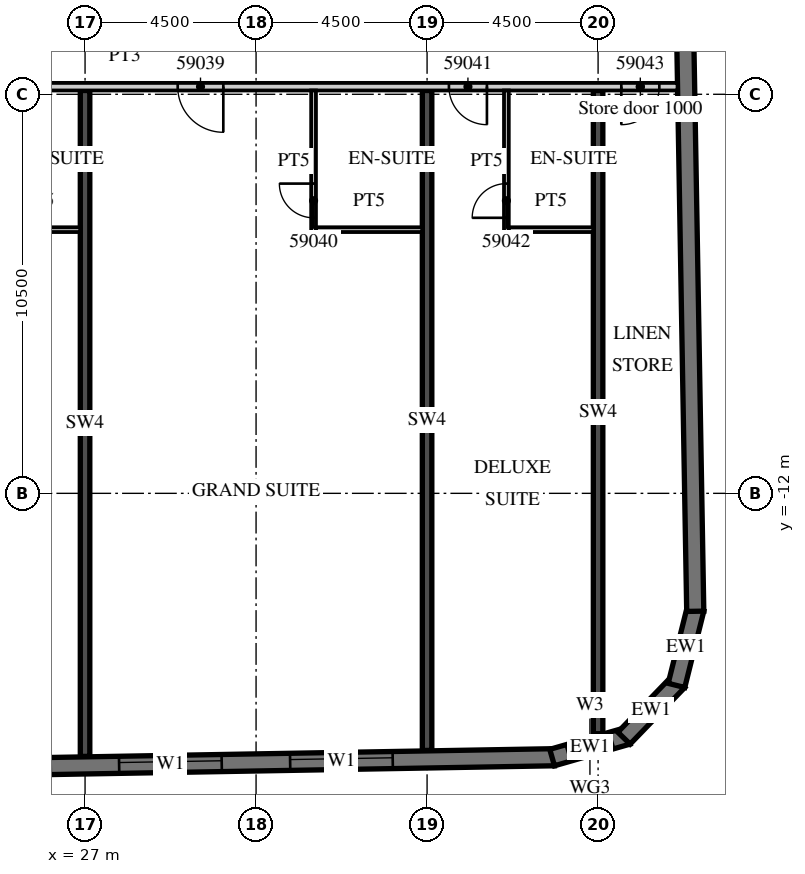
"""IFC4 building model, lengths in metres.
Left out: names, types, materials, properties, quantities, classifications, styles, units other than length and angle.
Written with IfcOpenShell. Run it as: python <this file> out.ifc"""

import sys

from ifc_helpers import new_model, si_unit, direction, frame, frame_2d, origin, place, context, subcontext, project, spatial, polyline, rectangle, outline, extrude, element, fill, save


model = new_model("IFC4")
c1 = context("Model", 3, precision=1e-05, world=origin(), true_north=direction((0.0, 1.0)))
c2 = subcontext(c1, "Body", "Model", "MODEL_VIEW")
j1 = project(units=[si_unit("LENGTHUNIT", "METRE"), si_unit("PLANEANGLEUNIT", "RADIAN")], contexts=[c1])
p1 = place(None, origin())
s1 = spatial("IfcSite", under=j1, at=p1, CompositionType="ELEMENT")
p2 = place(p1, origin())
s2 = spatial("IfcBuilding", under=s1, at=p2, CompositionType="ELEMENT")
p3 = place(p2, frame((0.0, 0.0, 240.8)))
s3 = spatial("IfcBuildingStorey", under=s2, at=p3, CompositionType="ELEMENT", Elevation=240.8)
p4 = place(p3, frame((27.0, -18.922, 0.0), z_axis=(0.0, 0.0, 1.0), x_axis=(0.0, 1.0, 0.0)))
e1 = element("IfcWall", 1, at=p4, inside=s3, PredefinedType="SHEAR", context=c2, shape_type="SweptSolid", body=[
    extrude(rectangle(XDim=17.522, YDim=0.25, at=frame_2d((8.761, 0.0))), origin(), (0.0, 0.0, 1.0), 3.3),
])
p5 = place(p3, frame((36.0, -18.765, 0.0), z_axis=(0.0, 0.0, 1.0), x_axis=(0.0, 1.0, 0.0)))
e2 = element("IfcWall", 2, at=p5, inside=s3, PredefinedType="SHEAR", context=c2, shape_type="SweptSolid", body=[
    extrude(rectangle(XDim=17.365, YDim=0.25, at=frame_2d((8.683, 0.0))), origin(), (0.0, 0.0, 1.0), 3.3),
])
p6 = place(p3, frame((40.5, -18.325, 0.0), z_axis=(0.0, 0.0, 1.0), x_axis=(0.0, 1.0, 0.0)))
e3 = element("IfcWall", 3, at=p6, inside=s3, PredefinedType="SHEAR", context=c2, shape_type="SweptSolid", body=[
    extrude(rectangle(XDim=16.925, YDim=0.25, at=frame_2d((8.463, 0.0))), origin(), (0.0, 0.0, 1.0), 3.3),
])
p7 = place(p3, frame((-13.504, -19.866, 0.0), z_axis=(0.0, 0.0, 1.0), x_axis=(0.999847672978, 0.017453676992, 0.0)))
e4 = element("IfcWall", 4, at=p7, inside=s3, PredefinedType="SOLIDWALL", context=c2, shape_type="SweptSolid", body=[
    extrude(rectangle(XDim=52.86, YDim=0.45, at=frame_2d((26.43, 0.0))), origin(), (0.0, 0.0, 1.0), 3.02),
])
p8 = place(p7, frame((0.9, 0.0, 0.45)))
e5 = element("IfcOpeningElement", 5, at=p8, cuts=e4, PredefinedType="OPENING", context=c2, shape_type="SweptSolid", body=[
    extrude(rectangle(XDim=2.7, YDim=2.25, at=frame_2d((1.35, 1.125))), frame((0.0, 0.235, 0.0), z_axis=(0.0, -1.0, 0.0), x_axis=(1.0, 0.0, 0.0)), (0.0, 0.0, 1.0), 0.47),
])
p9 = place(p7, frame((5.401, 0.0, 0.45)))
e6 = element("IfcOpeningElement", 6, at=p9, cuts=e4, PredefinedType="OPENING", context=c2, shape_type="SweptSolid", body=[
    extrude(rectangle(XDim=2.7, YDim=2.25, at=frame_2d((1.35, 1.125))), frame((0.0, 0.235, 0.0), z_axis=(0.0, -1.0, 0.0), x_axis=(1.0, 0.0, 0.0)), (0.0, 0.0, 1.0), 0.47),
])
p10 = place(p7, frame((9.902, 0.0, 0.45)))
e7 = element("IfcOpeningElement", 7, at=p10, cuts=e4, PredefinedType="OPENING", context=c2, shape_type="SweptSolid", body=[
    extrude(rectangle(XDim=2.7, YDim=2.25, at=frame_2d((1.35, 1.125))), frame((0.0, 0.235, 0.0), z_axis=(0.0, -1.0, 0.0), x_axis=(1.0, 0.0, 0.0)), (0.0, 0.0, 1.0), 0.47),
])
p11 = place(p7, frame((14.402, 0.0, 0.45)))
e8 = element("IfcOpeningElement", 8, at=p11, cuts=e4, PredefinedType="OPENING", context=c2, shape_type="SweptSolid", body=[
    extrude(rectangle(XDim=2.7, YDim=2.25, at=frame_2d((1.35, 1.125))), frame((0.0, 0.235, 0.0), z_axis=(0.0, -1.0, 0.0), x_axis=(1.0, 0.0, 0.0)), (0.0, 0.0, 1.0), 0.47),
])
p12 = place(p7, frame((18.903, 0.0, 0.45)))
e9 = element("IfcOpeningElement", 9, at=p12, cuts=e4, PredefinedType="OPENING", context=c2, shape_type="SweptSolid", body=[
    extrude(rectangle(XDim=2.7, YDim=2.25, at=frame_2d((1.35, 1.125))), frame((0.0, 0.235, 0.0), z_axis=(0.0, -1.0, 0.0), x_axis=(1.0, 0.0, 0.0)), (0.0, 0.0, 1.0), 0.47),
])
p13 = place(p7, frame((23.404, 0.0, 0.45)))
e10 = element("IfcOpeningElement", 10, at=p13, cuts=e4, PredefinedType="OPENING", context=c2, shape_type="SweptSolid", body=[
    extrude(rectangle(XDim=2.7, YDim=2.25, at=frame_2d((1.35, 1.125))), frame((0.0, 0.235, 0.0), z_axis=(0.0, -1.0, 0.0), x_axis=(1.0, 0.0, 0.0)), (0.0, 0.0, 1.0), 0.47),
])
p14 = place(p7, frame((27.904, 0.0, 0.45)))
e11 = element("IfcOpeningElement", 11, at=p14, cuts=e4, PredefinedType="OPENING", context=c2, shape_type="SweptSolid", body=[
    extrude(rectangle(XDim=2.7, YDim=2.25, at=frame_2d((1.35, 1.125))), frame((0.0, 0.235, 0.0), z_axis=(0.0, -1.0, 0.0), x_axis=(1.0, 0.0, 0.0)), (0.0, 0.0, 1.0), 0.47),
])
p15 = place(p7, frame((32.405, 0.0, 0.45)))
e12 = element("IfcOpeningElement", 12, at=p15, cuts=e4, PredefinedType="OPENING", context=c2, shape_type="SweptSolid", body=[
    extrude(rectangle(XDim=2.7, YDim=2.25, at=frame_2d((1.35, 1.125))), frame((0.0, 0.235, 0.0), z_axis=(0.0, -1.0, 0.0), x_axis=(1.0, 0.0, 0.0)), (0.0, 0.0, 1.0), 0.47),
])
p16 = place(p7, frame((36.906, 0.0, 0.45)))
e13 = element("IfcOpeningElement", 13, at=p16, cuts=e4, PredefinedType="OPENING", context=c2, shape_type="SweptSolid", body=[
    extrude(rectangle(XDim=2.7, YDim=2.25, at=frame_2d((1.35, 1.125))), frame((0.0, 0.235, 0.0), z_axis=(0.0, -1.0, 0.0), x_axis=(1.0, 0.0, 0.0)), (0.0, 0.0, 1.0), 0.47),
])
p17 = place(p7, frame((41.406, 0.0, 0.45)))
e14 = element("IfcOpeningElement", 14, at=p17, cuts=e4, PredefinedType="OPENING", context=c2, shape_type="SweptSolid", body=[
    extrude(rectangle(XDim=2.7, YDim=2.25, at=frame_2d((1.35, 1.125))), frame((0.0, 0.235, 0.0), z_axis=(0.0, -1.0, 0.0), x_axis=(1.0, 0.0, 0.0)), (0.0, 0.0, 1.0), 0.47),
])
p18 = place(p7, frame((45.907, 0.0, 0.45)))
e15 = element("IfcOpeningElement", 15, at=p18, cuts=e4, PredefinedType="OPENING", context=c2, shape_type="SweptSolid", body=[
    extrude(rectangle(XDim=2.7, YDim=2.25, at=frame_2d((1.35, 1.125))), frame((0.0, 0.235, 0.0), z_axis=(0.0, -1.0, 0.0), x_axis=(1.0, 0.0, 0.0)), (0.0, 0.0, 1.0), 0.47),
])
p19 = place(p3, frame((39.29, -18.952, 0.0), z_axis=(0.0, 0.0, 1.0), x_axis=(0.961247584925, 0.275686562016, 0.0)))
e16 = element("IfcWall", 16, at=p19, inside=s3, PredefinedType="SOLIDWALL", context=c2, shape_type="SweptSolid", body=[
    extrude(outline(polyline([(0.0, -0.225), (2.071, -0.225), (1.95, 0.225), (0.121, 0.225), (0.0, -0.225)])), origin(), (0.0, 0.0, 1.0), 3.02),
])
p20 = place(p19, frame((0.435, 0.0, 0.45)))
e17 = element("IfcOpeningElement", 17, at=p20, cuts=e16, PredefinedType="OPENING", context=c2, shape_type="SweptSolid", body=[
    extrude(rectangle(XDim=1.2, YDim=2.25, at=frame_2d((0.6, 1.125))), frame((0.0, 0.235, 0.0), z_axis=(0.0, -1.0, 0.0), x_axis=(1.0, 0.0, 0.0)), (0.0, 0.0, 1.0), 0.47),
])
p21 = place(p3, frame((41.181, -18.442, 0.0), z_axis=(0.0, 0.0, 1.0), x_axis=(0.694678672846, 0.719320193998, 0.0)))
e18 = element("IfcWall", 18, at=p21, inside=s3, PredefinedType="SOLIDWALL", context=c2, shape_type="SweptSolid", body=[
    extrude(outline(polyline([(0.0, -0.225), (2.071, -0.225), (1.95, 0.225), (0.121, 0.225), (0.0, -0.225)])), origin(), (0.0, 0.0, 1.0), 3.02),
])
p22 = place(p3, frame((42.563, -17.054, 0.0), z_axis=(0.0, 0.0, 1.0), x_axis=(0.241841950319, 0.970315655375, 0.0)))
e19 = element("IfcWall", 19, at=p22, inside=s3, PredefinedType="SOLIDWALL", context=c2, shape_type="SweptSolid", body=[
    extrude(outline(polyline([(0.0, -0.225), (2.071, -0.225), (1.95, 0.225), (0.121, 0.225), (0.0, -0.225)])), origin(), (0.0, 0.0, 1.0), 3.02),
])
p23 = place(p3, frame((43.057, -15.103, 0.0), z_axis=(0.0, 0.0, 1.0), x_axis=(-0.017452408953, 0.999847695112, 0.0)))
e20 = element("IfcWall", 20, at=p23, inside=s3, PredefinedType="SOLIDWALL", context=c2, shape_type="SweptSolid", body=[
    extrude(rectangle(XDim=33.0, YDim=0.45, at=frame_2d((16.5, 0.0))), origin(), (0.0, 0.0, 1.0), 3.02),
])
p24 = place(p3, frame((13.5, -1.3, 0.0), z_axis=(0.0, 0.0, 1.0), x_axis=(1.0, 0.0, 0.0)))
e21 = element("IfcWall", 21, at=p24, inside=s3, PredefinedType="PARTITIONING", context=c2, shape_type="SweptSolid", body=[
    extrude(rectangle(XDim=29.091, YDim=0.2, at=frame_2d((14.545, 0.0))), origin(), (0.0, 0.0, 1.0), 3.02),
])
p25 = place(p24, frame((0.575, 0.0, 0.0)))
e22 = element("IfcOpeningElement", 22, at=p25, cuts=e21, PredefinedType="OPENING", context=c2, shape_type="SweptSolid", body=[
    extrude(rectangle(XDim=1.0, YDim=2.1, at=frame_2d((0.5, 1.05))), frame((0.0, 0.11, 0.0), z_axis=(0.0, -1.0, 0.0), x_axis=(1.0, 0.0, 0.0)), (0.0, 0.0, 1.0), 0.22),
])
p26 = place(p24, frame((7.45, 0.0, 0.0)))
e23 = element("IfcOpeningElement", 23, at=p26, cuts=e21, PredefinedType="OPENING", context=c2, shape_type="SweptSolid", body=[
    extrude(rectangle(XDim=1.0, YDim=2.1, at=frame_2d((0.5, 1.05))), frame((0.0, 0.11, 0.0), z_axis=(0.0, -1.0, 0.0), x_axis=(1.0, 0.0, 0.0)), (0.0, 0.0, 1.0), 0.22),
])
p27 = place(p24, frame((9.55, 0.0, 0.0)))
e24 = element("IfcOpeningElement", 24, at=p27, cuts=e21, PredefinedType="OPENING", context=c2, shape_type="SweptSolid", body=[
    extrude(rectangle(XDim=1.0, YDim=2.1, at=frame_2d((0.5, 1.05))), frame((0.0, 0.11, 0.0), z_axis=(0.0, -1.0, 0.0), x_axis=(1.0, 0.0, 0.0)), (0.0, 0.0, 1.0), 0.22),
])
p28 = place(p24, frame((15.938, 0.0, 0.0)))
e25 = element("IfcOpeningElement", 25, at=p28, cuts=e21, PredefinedType="OPENING", context=c2, shape_type="SweptSolid", body=[
    extrude(rectangle(XDim=1.2, YDim=2.1, at=frame_2d((0.6, 1.05))), frame((0.0, 0.11, 0.0), z_axis=(0.0, -1.0, 0.0), x_axis=(1.0, 0.0, 0.0)), (0.0, 0.0, 1.0), 0.22),
])
p29 = place(p24, frame((23.075, 0.0, 0.0)))
e26 = element("IfcOpeningElement", 26, at=p29, cuts=e21, PredefinedType="OPENING", context=c2, shape_type="SweptSolid", body=[
    extrude(rectangle(XDim=1.0, YDim=2.1, at=frame_2d((0.5, 1.05))), frame((0.0, 0.11, 0.0), z_axis=(0.0, -1.0, 0.0), x_axis=(1.0, 0.0, 0.0)), (0.0, 0.0, 1.0), 0.22),
])
p30 = place(p24, frame((27.611, 0.0, 0.0)))
e27 = element("IfcOpeningElement", 27, at=p30, cuts=e21, PredefinedType="OPENING", context=c2, shape_type="SweptSolid", body=[
    extrude(rectangle(XDim=1.0, YDim=2.4, at=frame_2d((0.5, 1.2))), frame((0.0, 0.11, 0.0), z_axis=(0.0, -1.0, 0.0), x_axis=(1.0, 0.0, 0.0)), (0.0, 0.0, 1.0), 0.22),
])
p31 = place(p3, frame((24.625, -5.062, 0.0), z_axis=(0.0, 0.0, 1.0), x_axis=(1.0, 0.0, 0.0)))
e28 = element("IfcWall", 28, at=p31, inside=s3, PredefinedType="PARTITIONING", context=c2, shape_type="SweptSolid", body=[
    extrude(rectangle(XDim=2.25, YDim=0.125, at=frame_2d((1.125, 0.0))), origin(), (0.0, 0.0, 1.0), 3.02),
])
p32 = place(p3, frame((33.013, -5.125, 0.0), z_axis=(0.0, 0.0, 1.0), x_axis=(0.0, 1.0, 0.0)))
e29 = element("IfcWall", 29, at=p32, inside=s3, PredefinedType="PARTITIONING", context=c2, shape_type="SweptSolid", body=[
    extrude(rectangle(XDim=3.725, YDim=0.125, at=frame_2d((1.863, 0.0))), origin(), (0.0, 0.0, 1.0), 3.02),
])
p33 = place(p32, frame((0.375, 0.0, 0.0)))
e30 = element("IfcOpeningElement", 30, at=p33, cuts=e29, PredefinedType="OPENING", context=c2, shape_type="SweptSolid", body=[
    extrude(rectangle(XDim=0.9, YDim=2.1, at=frame_2d((0.45, 1.05))), frame((0.0, 0.073, 0.0), z_axis=(0.0, -1.0, 0.0), x_axis=(1.0, 0.0, 0.0)), (0.0, 0.0, 1.0), 0.145),
])
p34 = place(p3, frame((33.075, -5.062, 0.0), z_axis=(0.0, 0.0, 1.0), x_axis=(1.0, 0.0, 0.0)))
e31 = element("IfcWall", 31, at=p34, inside=s3, PredefinedType="PARTITIONING", context=c2, shape_type="SweptSolid", body=[
    extrude(rectangle(XDim=2.8, YDim=0.125, at=frame_2d((1.4, 0.0))), origin(), (0.0, 0.0, 1.0), 3.02),
])
p35 = place(p3, frame((38.087, -5.125, 0.0), z_axis=(0.0, 0.0, 1.0), x_axis=(0.0, 1.0, 0.0)))
e32 = element("IfcWall", 32, at=p35, inside=s3, PredefinedType="PARTITIONING", context=c2, shape_type="SweptSolid", body=[
    extrude(rectangle(XDim=3.725, YDim=0.125, at=frame_2d((1.863, 0.0))), origin(), (0.0, 0.0, 1.0), 3.02),
])
p36 = place(p35, frame((0.375, 0.0, 0.0)))
e33 = element("IfcOpeningElement", 33, at=p36, cuts=e32, PredefinedType="OPENING", context=c2, shape_type="SweptSolid", body=[
    extrude(rectangle(XDim=0.9, YDim=2.1, at=frame_2d((0.45, 1.05))), frame((0.0, 0.073, 0.0), z_axis=(0.0, -1.0, 0.0), x_axis=(1.0, 0.0, 0.0)), (0.0, 0.0, 1.0), 0.145),
])
p37 = place(p3, frame((38.15, -5.062, 0.0), z_axis=(0.0, 0.0, 1.0), x_axis=(1.0, 0.0, 0.0)))
e34 = element("IfcWall", 34, at=p37, inside=s3, PredefinedType="PARTITIONING", context=c2, shape_type="SweptSolid", body=[
    extrude(rectangle(XDim=2.225, YDim=0.125, at=frame_2d((1.113, 0.0))), origin(), (0.0, 0.0, 1.0), 3.02),
])
p38 = place(p17, origin())
e35 = element("IfcWindow", 35, at=p38, inside=s3, PartitioningType="SINGLE_PANEL", PredefinedType="WINDOW", context=c2, shape_type="SweptSolid", body=[
    extrude(rectangle(XDim=2.7, YDim=2.25, at=frame_2d((1.35, 1.125))), frame((0.0, 0.09, 0.0), z_axis=(0.0, -1.0, 0.0), x_axis=(1.0, 0.0, 0.0)), (0.0, 0.0, 1.0), 0.06),
])
fill(e14, e35)
p39 = place(p18, origin())
e36 = element("IfcWindow", 36, at=p39, inside=s3, PartitioningType="SINGLE_PANEL", PredefinedType="WINDOW", context=c2, shape_type="SweptSolid", body=[
    extrude(rectangle(XDim=2.7, YDim=2.25, at=frame_2d((1.35, 1.125))), frame((0.0, 0.09, 0.0), z_axis=(0.0, -1.0, 0.0), x_axis=(1.0, 0.0, 0.0)), (0.0, 0.0, 1.0), 0.06),
])
fill(e15, e36)
p40 = place(p20, origin())
e37 = element("IfcWindow", 37, at=p40, inside=s3, PartitioningType="SINGLE_PANEL", PredefinedType="WINDOW", context=c2, shape_type="SweptSolid", body=[
    extrude(rectangle(XDim=1.2, YDim=2.25, at=frame_2d((0.6, 1.125))), frame((0.0, 0.09, 0.0), z_axis=(0.0, -1.0, 0.0), x_axis=(1.0, 0.0, 0.0)), (0.0, 0.0, 1.0), 0.06),
])
fill(e17, e37)
p41 = place(p28, origin())
e38 = element("IfcDoor", 38, at=p41, inside=s3, OperationType="SINGLE_SWING_RIGHT", PredefinedType="DOOR", context=c2, shape_type="SweptSolid", body=[
    extrude(rectangle(XDim=1.2, YDim=2.1, at=frame_2d((0.6, 1.05))), frame((0.0, 0.025, 0.0), z_axis=(0.0, -1.0, 0.0), x_axis=(1.0, 0.0, 0.0)), (0.0, 0.0, 1.0), 0.05),
])
fill(e25, e38)
p42 = place(p33, origin())
e39 = element("IfcDoor", 39, at=p42, inside=s3, OperationType="SINGLE_SWING_RIGHT", PredefinedType="DOOR", context=c2, shape_type="SweptSolid", body=[
    extrude(rectangle(XDim=0.9, YDim=2.1, at=frame_2d((0.45, 1.05))), frame((0.0, 0.025, 0.0), z_axis=(0.0, -1.0, 0.0), x_axis=(1.0, 0.0, 0.0)), (0.0, 0.0, 1.0), 0.05),
])
fill(e30, e39)
p43 = place(p29, origin())
e40 = element("IfcDoor", 40, at=p43, inside=s3, OperationType="SINGLE_SWING_RIGHT", PredefinedType="DOOR", context=c2, shape_type="SweptSolid", body=[
    extrude(rectangle(XDim=1.0, YDim=2.1, at=frame_2d((0.5, 1.05))), frame((0.0, 0.025, 0.0), z_axis=(0.0, -1.0, 0.0), x_axis=(1.0, 0.0, 0.0)), (0.0, 0.0, 1.0), 0.05),
])
fill(e26, e40)
p44 = place(p36, origin())
e41 = element("IfcDoor", 41, at=p44, inside=s3, OperationType="SINGLE_SWING_LEFT", PredefinedType="DOOR", context=c2, shape_type="SweptSolid", body=[
    extrude(rectangle(XDim=0.9, YDim=2.1, at=frame_2d((0.45, 1.05))), frame((0.0, 0.025, 0.0), z_axis=(0.0, -1.0, 0.0), x_axis=(1.0, 0.0, 0.0)), (0.0, 0.0, 1.0), 0.05),
])
fill(e33, e41)
p45 = place(p30, origin())
e42 = element("IfcDoor", 42, at=p45, inside=s3, OperationType="SINGLE_SWING_LEFT", PredefinedType="DOOR", context=c2, shape_type="SweptSolid", body=[
    extrude(rectangle(XDim=1.0, YDim=2.4, at=frame_2d((0.5, 1.2))), frame((0.0, 0.025, 0.0), z_axis=(0.0, -1.0, 0.0), x_axis=(1.0, 0.0, 0.0)), (0.0, 0.0, 1.0), 0.05),
])
fill(e27, e42)
save(model, sys.argv[1])
